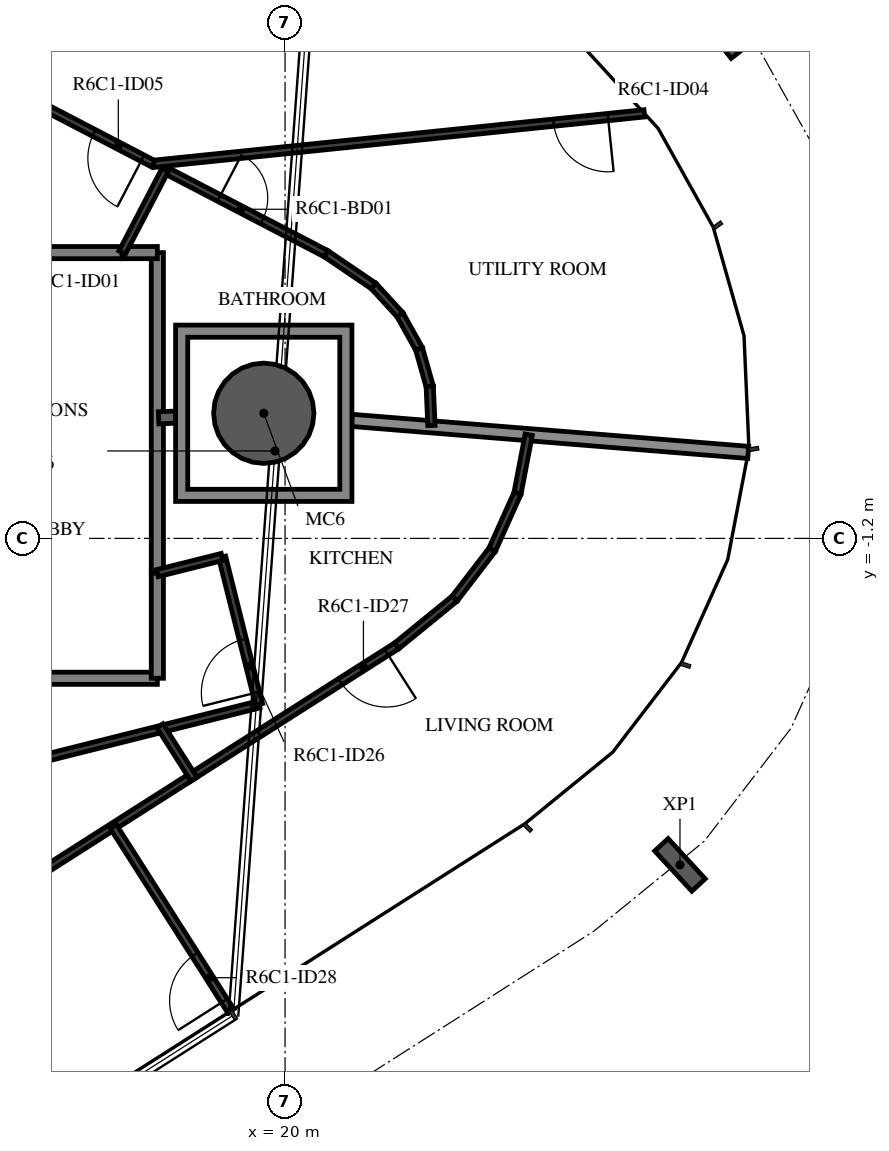
"""IFC4 building model, lengths in metres.
Left out: names, types, materials, properties, quantities, classifications, styles, units other than length and angle.
Written with IfcOpenShell. Run it as: python <this file> out.ifc"""

import sys

from ifc_helpers import new_model, si_unit, direction, frame, frame_2d, origin, origin_2d, place, context, subcontext, project, spatial, polyline, rectangle, hollow_circle, i_section, outline, extrude, element, fill, save


model = new_model("IFC4")
c1 = context("Model", 3, precision=1e-05, world=origin(), true_north=direction((0.0, 1.0)))
c2 = subcontext(c1, "Body", "Model", "MODEL_VIEW")
j1 = project(units=[si_unit("LENGTHUNIT", "METRE"), si_unit("PLANEANGLEUNIT", "RADIAN")], contexts=[c1])
p1 = place(None, origin())
s1 = spatial("IfcSite", under=j1, at=p1, CompositionType="ELEMENT")
p2 = place(p1, origin())
s2 = spatial("IfcBuilding", under=s1, at=p2, CompositionType="ELEMENT")
p3 = place(p2, frame((0.0, 0.0, 251.2)))
s3 = spatial("IfcBuildingStorey", under=s2, at=p3, CompositionType="ELEMENT", Elevation=251.2)
p4 = place(p3, frame((19.65, 0.858, -0.38), z_axis=(0.0, 0.0, 1.0), x_axis=(1.0, 0.0, 0.0)))
e1 = element("IfcColumn", 1, at=p4, inside=s3, PredefinedType="COLUMN", context=c2, shape_type="SweptSolid", body=[
    extrude(hollow_circle(Radius=0.825, WallThickness=0.04, at=origin_2d()), origin(), (0.0, 0.0, 1.0), 3.5),
])
for number, where, z_axis, x_axis in (
    (2, (26.495, -6.569, -0.38), (0.0, 0.0, 1.0), (-0.735, -0.678, 0.0)),
    (3, (27.598, 7.09, -0.38), (0.0, 0.0, 1.0), (0.617, -0.787, 0.0)),
):
    element("IfcColumn", number, at=place(p3, frame(where, z_axis=z_axis, x_axis=x_axis)), inside=s3, PredefinedType="COLUMN", context=c2, shape_type="SweptSolid", body=[
        extrude(i_section(OverallWidth=0.3, OverallDepth=0.9, WebThickness=0.019, FlangeThickness=0.035, FilletRadius=0.03, at=origin_2d()), origin(), (0.0, 0.0, 1.0), 3.5),
    ])
p5 = place(p3, frame((17.321, 3.5, 0.0), z_axis=(0.0, 0.0, 1.0), x_axis=(-1.0, 0.0, 0.0)))
e4 = element("IfcWall", 4, at=p5, inside=s3, PredefinedType="STANDARD", context=c2, shape_type="SweptSolid", body=[
    extrude(rectangle(XDim=4.061, YDim=0.2, at=frame_2d((2.03, 0.0))), origin(), (0.0, 0.0, 1.0), 3.12),
])
p6 = place(p3, frame((17.9, -1.772, 0.0), z_axis=(0.0, 0.0, 1.0), x_axis=(0.0, 1.0, 0.0)))
e5 = element("IfcWall", 5, at=p6, inside=s3, PredefinedType="STANDARD", context=c2, shape_type="SweptSolid", body=[
    extrude(rectangle(XDim=5.272, YDim=0.2, at=frame_2d((2.636, 0.0))), origin(), (0.0, 0.0, 1.0), 3.12),
])
p7 = place(p3, frame((17.9, 3.5, 0.0), z_axis=(0.0, 0.0, 1.0), x_axis=(-1.0, 0.0, 0.0)))
e6 = element("IfcWall", 6, at=p7, inside=s3, PredefinedType="STANDARD", context=c2, shape_type="SweptSolid", body=[
    extrude(rectangle(XDim=0.579, YDim=0.2, at=frame_2d((0.29, 0.0))), origin(), (0.0, 0.0, 1.0), 3.12),
])
p8 = place(p3, frame((13.285, -3.5, 0.0), z_axis=(0.0, 0.0, 1.0), x_axis=(1.0, 0.0, 0.0)))
e7 = element("IfcWall", 7, at=p8, inside=s3, PredefinedType="STANDARD", context=c2, shape_type="SweptSolid", body=[
    extrude(rectangle(XDim=4.615, YDim=0.2, at=frame_2d((2.308, 0.0))), origin(), (0.0, 0.0, 1.0), 3.12),
])
p9 = place(p3, frame((17.9, -3.5, 0.0), z_axis=(0.0, 0.0, 1.0), x_axis=(0.0, 1.0, 0.0)))
e8 = element("IfcWall", 8, at=p9, inside=s3, PredefinedType="STANDARD", context=c2, shape_type="SweptSolid", body=[
    extrude(rectangle(XDim=1.728, YDim=0.2, at=frame_2d((0.864, 0.0))), origin(), (0.0, 0.0, 1.0), 3.12),
])
p10 = place(p3, frame((21.1, 0.741, 0.0), z_axis=(0.0, 0.0, 1.0), x_axis=(0.996750718609, -0.080548153006, 0.0)))
e9 = element("IfcWall", 9, at=p10, inside=s3, PredefinedType="STANDARD", context=c2, shape_type="SweptSolid", body=[
    extrude(rectangle(XDim=6.538, YDim=0.2, at=frame_2d((3.269, 0.0))), origin(), (0.0, 0.0, 1.0), 2.73),
])
p11 = place(p3, frame((17.92, 0.782, 0.0), z_axis=(0.0, 0.0, 1.0), x_axis=(0.999051221661, 0.04355061995, 0.0)))
e10 = element("IfcWall", 10, at=p11, inside=s3, PredefinedType="STANDARD", context=c2, shape_type="SweptSolid", body=[
    extrude(rectangle(XDim=0.28, YDim=0.2, at=frame_2d((0.14, 0.0))), origin(), (0.0, 0.0, 1.0), 3.12),
])
p12 = place(p3, frame((18.028, 4.859, 0.0), z_axis=(0.0, 0.0, 1.0), x_axis=(0.88702512027, -0.46172116695, 0.0)))
e11 = element("IfcWall", 11, at=p12, inside=s3, PredefinedType="PARTITIONING", context=c2, shape_type="SweptSolid", body=[
    extrude(rectangle(XDim=2.983, YDim=0.12, at=frame_2d((1.492, 0.0))), origin(), (0.0, 0.0, 1.0), 3.12),
])
p13 = place(p12, frame((1.0, 0.0, 0.0)))
e12 = element("IfcOpeningElement", 12, at=p13, cuts=e11, PredefinedType="OPENING", context=c2, shape_type="SweptSolid", body=[
    extrude(rectangle(XDim=0.8, YDim=2.1, at=frame_2d((0.4, 1.05))), frame((0.0, 0.07, 0.0), z_axis=(0.0, -1.0, 0.0), x_axis=(1.0, 0.0, 0.0)), (0.0, 0.0, 1.0), 0.14),
])
p14 = place(p3, frame((20.674, 3.481, 0.0), z_axis=(0.0, 0.0, 1.0), x_axis=(0.827420148173, -0.56158338508, 0.0)))
e13 = element("IfcWall", 13, at=p14, inside=s3, PredefinedType="PARTITIONING", context=c2, shape_type="SweptSolid", body=[
    extrude(rectangle(XDim=0.947, YDim=0.12, at=frame_2d((0.473, 0.0))), origin(), (0.0, 0.0, 1.0), 3.12),
])
for number, where, z_axis, x_axis in (
    (14, (21.458, 2.95, 0.0), (0.0, 0.0, 1.0), (0.676, -0.737, 0.0)),
    (15, (21.891, 2.477, 0.0), (0.0, 0.0, 1.0), (0.487, -0.873, 0.0)),
):
    element("IfcWall", number, at=place(p3, frame(where, z_axis=z_axis, x_axis=x_axis)), inside=s3, PredefinedType="PARTITIONING", context=c2, shape_type="SweptSolid", body=[
        extrude(rectangle(XDim=0.642, YDim=0.12, at=frame_2d((0.321, 0.0))), origin(), (0.0, 0.0, 1.0), 3.12),
    ])
p15 = place(p3, frame((22.204, 1.916, 0.0), z_axis=(0.0, 0.0, 1.0), x_axis=(0.273013196411, -0.962010288191, 0.0)))
e16 = element("IfcWall", 16, at=p15, inside=s3, PredefinedType="PARTITIONING", context=c2, shape_type="SweptSolid", body=[
    extrude(rectangle(XDim=0.642, YDim=0.12, at=frame_2d((0.321, 0.0))), origin(), (0.0, 0.0, 1.0), 3.12),
])
p16 = place(p3, frame((22.379, 1.298, 0.0), z_axis=(0.0, 0.0, 1.0), x_axis=(0.043354705242, -0.999059742725, 0.0)))
e17 = element("IfcWall", 17, at=p16, inside=s3, PredefinedType="PARTITIONING", context=c2, shape_type="SweptSolid", body=[
    extrude(rectangle(XDim=0.642, YDim=0.12, at=frame_2d((0.321, 0.0))), origin(), (0.0, 0.0, 1.0), 3.12),
])
p17 = place(p3, frame((25.908, 5.79, 0.0), z_axis=(0.0, 0.0, 1.0), x_axis=(-0.994752982456, -0.102305932847, 0.0)))
e18 = element("IfcWall", 18, at=p17, inside=s3, PredefinedType="PARTITIONING", context=c2, shape_type="SweptSolid", body=[
    extrude(rectangle(XDim=8.116, YDim=0.12, at=frame_2d((4.058, 0.0))), origin(), (0.0, 0.0, 1.0), 3.12),
])
p18 = place(p17, frame((0.6, 0.0, 0.0)))
e19 = element("IfcOpeningElement", 19, at=p18, cuts=e18, PredefinedType="OPENING", context=c2, shape_type="SweptSolid", body=[
    extrude(rectangle(XDim=0.9, YDim=2.1, at=frame_2d((0.45, 1.05))), frame((0.0, 0.07, 0.0), z_axis=(0.0, -1.0, 0.0), x_axis=(1.0, 0.0, 0.0)), (0.0, 0.0, 1.0), 0.14),
])
p19 = place(p3, frame((18.028, 4.859, 0.0), z_axis=(0.0, 0.0, 1.0), x_axis=(-0.461688901614, -0.887041914526, 0.0)))
e20 = element("IfcWall", 20, at=p19, inside=s3, PredefinedType="PARTITIONING", context=c2, shape_type="SweptSolid", body=[
    extrude(rectangle(XDim=1.532, YDim=0.12, at=frame_2d((0.766, 0.0))), origin(), (0.0, 0.0, 1.0), 3.12),
])
p20 = place(p3, frame((17.834, 4.96, 0.0), z_axis=(0.0, 0.0, 1.0), x_axis=(-0.887008743782, 0.461752626906, 0.0)))
e21 = element("IfcWall", 21, at=p20, inside=s3, PredefinedType="PARTITIONING", context=c2, shape_type="SweptSolid", body=[
    extrude(rectangle(XDim=5.612, YDim=0.12, at=frame_2d((2.806, 0.0))), origin(), (0.0, 0.0, 1.0), 3.12),
])
p21 = place(p20, frame((0.2, 0.0, 0.0)))
e22 = element("IfcOpeningElement", 22, at=p21, cuts=e21, PredefinedType="OPENING", context=c2, shape_type="SweptSolid", body=[
    extrude(rectangle(XDim=0.9, YDim=2.1, at=frame_2d((0.45, 1.05))), frame((0.0, 0.07, 0.0), z_axis=(0.0, -1.0, 0.0), x_axis=(1.0, 0.0, 0.0)), (0.0, 0.0, 1.0), 0.14),
])
p22 = place(p3, frame((14.029, -5.32, 0.0), z_axis=(0.0, 0.0, 1.0), x_axis=(0.969999099814, 0.243108507378, 0.0)))
e23 = element("IfcWall", 23, at=p22, inside=s3, PredefinedType="PARTITIONING", context=c2, shape_type="SweptSolid", body=[
    extrude(rectangle(XDim=5.715, YDim=0.12, at=frame_2d((2.857, 0.0))), origin(), (0.0, 0.0, 1.0), 3.12),
])
p23 = place(p3, frame((19.573, -3.93, 0.0), z_axis=(0.0, 0.0, 1.0), x_axis=(-0.243155959183, 0.96998720585, 0.0)))
e24 = element("IfcWall", 24, at=p23, inside=s3, PredefinedType="PARTITIONING", context=c2, shape_type="SweptSolid", body=[
    extrude(rectangle(XDim=2.5, YDim=0.12, at=frame_2d((1.25, 0.0))), origin(), (0.0, 0.0, 1.0), 3.12),
])
p24 = place(p23, frame((0.2, 0.0, 0.0)))
e25 = element("IfcOpeningElement", 25, at=p24, cuts=e24, PredefinedType="OPENING", context=c2, shape_type="SweptSolid", body=[
    extrude(rectangle(XDim=0.9, YDim=2.1, at=frame_2d((0.45, 1.05))), frame((0.0, 0.07, 0.0), z_axis=(0.0, -1.0, 0.0), x_axis=(1.0, 0.0, 0.0)), (0.0, 0.0, 1.0), 0.14),
])
p25 = place(p3, frame((18.965, -1.505, 0.0), z_axis=(0.0, 0.0, 1.0), x_axis=(-0.969998406835, -0.243111272339, 0.0)))
e26 = element("IfcWall", 26, at=p25, inside=s3, PredefinedType="PARTITIONING", context=c2, shape_type="SweptSolid", body=[
    extrude(rectangle(XDim=1.098, YDim=0.12, at=frame_2d((0.549, 0.0))), origin(), (0.0, 0.0, 1.0), 3.12),
])
p26 = place(p3, frame((21.837, -2.966, 0.0), z_axis=(0.0, 0.0, 1.0), x_axis=(-0.843394529709, -0.537294767569, 0.0)))
e27 = element("IfcWall", 27, at=p26, inside=s3, PredefinedType="PARTITIONING", context=c2, shape_type="SweptSolid", body=[
    extrude(rectangle(XDim=11.678, YDim=0.12, at=frame_2d((5.839, 0.0))), origin(), (0.0, 0.0, 1.0), 3.12),
])
p27 = place(p26, frame((0.2, 0.0, 0.0)))
e28 = element("IfcOpeningElement", 28, at=p27, cuts=e27, PredefinedType="OPENING", context=c2, shape_type="SweptSolid", body=[
    extrude(rectangle(XDim=0.9, YDim=2.1, at=frame_2d((0.45, 1.05))), frame((0.0, 0.07, 0.0), z_axis=(0.0, -1.0, 0.0), x_axis=(1.0, 0.0, 0.0)), (0.0, 0.0, 1.0), 0.14),
])
p28 = place(p3, frame((19.109, -8.972, 0.0), z_axis=(0.0, 0.0, 1.0), x_axis=(-0.537318625891, 0.843379329999, 0.0)))
e29 = element("IfcWall", 29, at=p28, inside=s3, PredefinedType="PARTITIONING", context=c2, shape_type="SweptSolid", body=[
    extrude(rectangle(XDim=3.6, YDim=0.12, at=frame_2d((1.8, 0.0))), origin(), (0.0, 0.0, 1.0), 2.73),
])
p29 = place(p28, frame((0.2, 0.0, 0.0)))
e30 = element("IfcOpeningElement", 30, at=p29, cuts=e29, PredefinedType="OPENING", context=c2, shape_type="SweptSolid", body=[
    extrude(rectangle(XDim=0.9, YDim=2.1, at=frame_2d((0.45, 1.05))), frame((0.0, 0.07, 0.0), z_axis=(0.0, -1.0, 0.0), x_axis=(1.0, 0.0, 0.0)), (0.0, 0.0, 1.0), 0.14),
])
p30 = place(p3, frame((18.503, -5.161, 0.0), z_axis=(0.0, 0.0, 1.0), x_axis=(-0.537208231854, 0.843449652101, 0.0)))
e31 = element("IfcWall", 31, at=p30, inside=s3, PredefinedType="PARTITIONING", context=c2, shape_type="SweptSolid", body=[
    extrude(rectangle(XDim=1.044, YDim=0.12, at=frame_2d((0.522, 0.0))), origin(), (0.0, 0.0, 1.0), 3.12),
])
p31 = place(p3, frame((24.007, 0.506, 0.0), z_axis=(0.0, 0.0, 1.0), x_axis=(-0.187878189528, -0.98219233651, 0.0)))
e32 = element("IfcWall", 32, at=p31, inside=s3, PredefinedType="PARTITIONING", context=c2, shape_type="SweptSolid", body=[
    extrude(rectangle(XDim=0.981, YDim=0.12, at=frame_2d((0.491, 0.0))), origin(), (0.0, 0.0, 1.0), 3.12),
])
p32 = place(p3, frame((23.823, -0.458, 0.0), z_axis=(0.0, 0.0, 1.0), x_axis=(-0.409435319137, -0.912339147161, 0.0)))
e33 = element("IfcWall", 33, at=p32, inside=s3, PredefinedType="PARTITIONING", context=c2, shape_type="SweptSolid", body=[
    extrude(rectangle(XDim=1.016, YDim=0.12, at=frame_2d((0.508, 0.0))), origin(), (0.0, 0.0, 1.0), 3.12),
])
p33 = place(p3, frame((23.407, -1.385, 0.0), z_axis=(0.0, 0.0, 1.0), x_axis=(-0.608769538934, -0.793347117261, 0.0)))
e34 = element("IfcWall", 34, at=p33, inside=s3, PredefinedType="PARTITIONING", context=c2, shape_type="SweptSolid", body=[
    extrude(rectangle(XDim=1.016, YDim=0.12, at=frame_2d((0.508, 0.0))), origin(), (0.0, 0.0, 1.0), 3.12),
])
p34 = place(p3, frame((22.789, -2.191, 0.0), z_axis=(0.0, 0.0, 1.0), x_axis=(-0.775267457727, -0.631633096813, 0.0)))
e35 = element("IfcWall", 35, at=p34, inside=s3, PredefinedType="PARTITIONING", context=c2, shape_type="SweptSolid", body=[
    extrude(rectangle(XDim=1.227, YDim=0.12, at=frame_2d((0.614, 0.0))), origin(), (0.0, 0.0, 1.0), 3.12),
])
p35 = place(p3, origin())
e36 = element("IfcWall", 36, at=p35, inside=s3, PredefinedType="STANDARD", context=c2, shape_type="SweptSolid", body=[
    extrude(outline(polyline([(21.1, 2.308), (21.1, -0.592), (18.2, -0.592), (18.2, 2.308), (21.1, 2.308)]), holes=[polyline([(18.4, -0.392), (20.9, -0.392), (20.9, 2.108), (18.4, 2.108), (18.4, -0.392)])]), origin(), (0.0, 0.0, 1.0), 3.12),
])
p36 = place(p18, origin())
e37 = element("IfcDoor", 37, at=p36, inside=s3, OperationType="SINGLE_SWING_LEFT", PredefinedType="DOOR", context=c2, shape_type="SweptSolid", body=[
    extrude(rectangle(XDim=0.9, YDim=2.1, at=frame_2d((0.45, 1.05))), frame((0.0, 0.025, 0.0), z_axis=(0.0, -1.0, 0.0), x_axis=(1.0, 0.0, 0.0)), (0.0, 0.0, 1.0), 0.05),
])
fill(e19, e37)
p37 = place(p13, origin())
e38 = element("IfcDoor", 38, at=p37, inside=s3, OperationType="SINGLE_SWING_RIGHT", PredefinedType="DOOR", context=c2, shape_type="SweptSolid", body=[
    extrude(rectangle(XDim=0.8, YDim=2.1, at=frame_2d((0.4, 1.05))), frame((0.0, 0.025, 0.0), z_axis=(0.0, -1.0, 0.0), x_axis=(1.0, 0.0, 0.0)), (0.0, 0.0, 1.0), 0.05),
])
fill(e12, e38)
p38 = place(p21, origin())
e39 = element("IfcDoor", 39, at=p38, inside=s3, OperationType="SINGLE_SWING_RIGHT", PredefinedType="DOOR", context=c2, shape_type="SweptSolid", body=[
    extrude(rectangle(XDim=0.9, YDim=2.1, at=frame_2d((0.45, 1.05))), frame((0.0, 0.025, 0.0), z_axis=(0.0, -1.0, 0.0), x_axis=(1.0, 0.0, 0.0)), (0.0, 0.0, 1.0), 0.05),
])
fill(e22, e39)
p39 = place(p24, origin())
e40 = element("IfcDoor", 40, at=p39, inside=s3, OperationType="SINGLE_SWING_RIGHT", PredefinedType="DOOR", context=c2, shape_type="SweptSolid", body=[
    extrude(rectangle(XDim=0.9, YDim=2.1, at=frame_2d((0.45, 1.05))), frame((0.0, 0.025, 0.0), z_axis=(0.0, -1.0, 0.0), x_axis=(1.0, 0.0, 0.0)), (0.0, 0.0, 1.0), 0.05),
])
fill(e25, e40)
p40 = place(p27, origin())
e41 = element("IfcDoor", 41, at=p40, inside=s3, OperationType="SINGLE_SWING_RIGHT", PredefinedType="DOOR", context=c2, shape_type="SweptSolid", body=[
    extrude(rectangle(XDim=0.9, YDim=2.1, at=frame_2d((0.45, 1.05))), frame((0.0, 0.025, 0.0), z_axis=(0.0, -1.0, 0.0), x_axis=(1.0, 0.0, 0.0)), (0.0, 0.0, 1.0), 0.05),
])
fill(e28, e41)
p41 = place(p29, origin())
e42 = element("IfcDoor", 42, at=p41, inside=s3, OperationType="SINGLE_SWING_LEFT", PredefinedType="DOOR", context=c2, shape_type="SweptSolid", body=[
    extrude(rectangle(XDim=0.9, YDim=2.1, at=frame_2d((0.45, 1.05))), frame((0.0, 0.025, 0.0), z_axis=(0.0, -1.0, 0.0), x_axis=(1.0, 0.0, 0.0)), (0.0, 0.0, 1.0), 0.05),
])
fill(e30, e42)
save(model, sys.argv[1])
